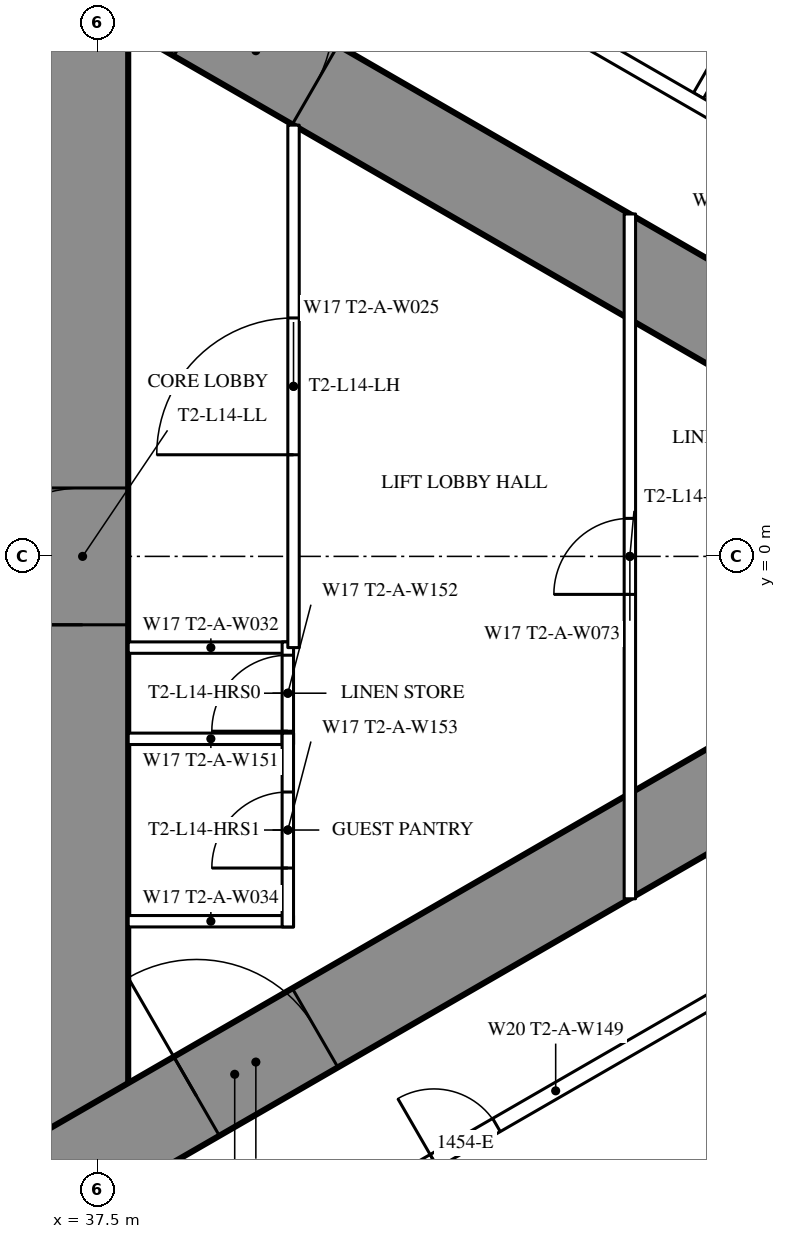
"""IFC4 building model, lengths in metres.
Left out: names, types, materials, properties, quantities, classifications, styles, units other than length and angle.
Written with IfcOpenShell. Run it as: python <this file> out.ifc"""

import sys

from ifc_helpers import new_model, si_unit, direction, frame, frame_2d, origin, place, context, subcontext, project, spatial, rectangle, extrude, element, fill, save


model = new_model("IFC4")
c1 = context("Model", 3, precision=1e-05, world=origin(), true_north=direction((0.0, 1.0)))
c2 = subcontext(c1, "Body", "Model", "MODEL_VIEW")
j1 = project(units=[si_unit("LENGTHUNIT", "METRE"), si_unit("PLANEANGLEUNIT", "RADIAN")], contexts=[c1])
p1 = place(None, origin())
s1 = spatial("IfcSite", under=j1, at=p1, CompositionType="ELEMENT")
p2 = place(p1, origin())
s2 = spatial("IfcBuilding", under=s1, at=p2, CompositionType="ELEMENT")
p3 = place(p2, frame((0.0, 0.0, 56.5)))
s3 = spatial("IfcBuildingStorey", under=s2, at=p3, CompositionType="ELEMENT", Elevation=56.5)
p4 = place(p3, frame((37.3, -8.6, 0.0), z_axis=(0.0, 0.0, 1.0), x_axis=(0.0, 1.0, 0.0)))
e1 = element("IfcWall", 1, at=p4, inside=s3, PredefinedType="SHEAR", context=c2, shape_type="SweptSolid", body=[
    extrude(rectangle(XDim=17.2, YDim=1.2, at=frame_2d((8.6, 0.0))), origin(), (0.0, 0.0, 1.0), 3.5),
])
p5 = place(p4, frame((7.7, 0.0, 0.0)))
e2 = element("IfcOpeningElement", 2, at=p5, cuts=e1, PredefinedType="OPENING", context=c2, shape_type="SweptSolid", body=[
    extrude(rectangle(XDim=1.8, YDim=2.2, at=frame_2d((0.9, 1.1))), frame((0.0, 0.61, 0.0), z_axis=(0.0, -1.0, 0.0), x_axis=(1.0, 0.0, 0.0)), (0.0, 0.0, 1.0), 1.22),
])
p6 = place(p3, frame((27.2, -13.8, 0.0), z_axis=(0.0, 0.0, 1.0), x_axis=(0.866027159892, 0.499996958321, 0.0)))
e3 = element("IfcWall", 3, at=p6, inside=s3, PredefinedType="SHEAR", context=c2, shape_type="SweptSolid", body=[
    extrude(rectangle(XDim=27.947, YDim=1.2, at=frame_2d((13.973, 0.0))), origin(), (0.0, 0.0, 1.0), 3.5),
])
p7 = place(p6, frame((4.6, 0.0, 0.0)))
e4 = element("IfcOpeningElement", 4, at=p7, cuts=e3, PredefinedType="OPENING", context=c2, shape_type="SweptSolid", body=[
    extrude(rectangle(XDim=1.0, YDim=2.2, at=frame_2d((0.5, 1.1))), frame((0.0, 0.61, 0.0), z_axis=(0.0, -1.0, 0.0), x_axis=(1.0, 0.0, 0.0)), (0.0, 0.0, 1.0), 1.22),
])
p8 = place(p6, frame((13.395, 0.0, 0.0)))
e5 = element("IfcOpeningElement", 5, at=p8, cuts=e3, PredefinedType="OPENING", context=c2, shape_type="SweptSolid", body=[
    extrude(rectangle(XDim=1.8, YDim=2.2, at=frame_2d((0.9, 1.1))), frame((0.0, 0.61, 0.0), z_axis=(0.0, -1.0, 0.0), x_axis=(1.0, 0.0, 0.0)), (0.0, 0.0, 1.0), 1.22),
])
p9 = place(p3, frame((27.2, 13.8, 0.0), z_axis=(0.0, 0.0, 1.0), x_axis=(0.866024515034, -0.500001539357, 0.0)))
e6 = element("IfcWall", 6, at=p9, inside=s3, PredefinedType="SHEAR", context=c2, shape_type="SweptSolid", body=[
    extrude(rectangle(XDim=26.907, YDim=1.2, at=frame_2d((13.454, 0.0))), origin(), (0.0, 0.0, 1.0), 3.5),
])
p10 = place(p9, frame((4.6, 0.0, 0.0)))
e7 = element("IfcOpeningElement", 7, at=p10, cuts=e6, PredefinedType="OPENING", context=c2, shape_type="SweptSolid", body=[
    extrude(rectangle(XDim=1.0, YDim=2.2, at=frame_2d((0.5, 1.1))), frame((0.0, 0.61, 0.0), z_axis=(0.0, -1.0, 0.0), x_axis=(1.0, 0.0, 0.0)), (0.0, 0.0, 1.0), 1.22),
])
p11 = place(p9, frame((13.395, 0.0, 0.0)))
e8 = element("IfcOpeningElement", 8, at=p11, cuts=e6, PredefinedType="OPENING", context=c2, shape_type="SweptSolid", body=[
    extrude(rectangle(XDim=1.8, YDim=2.2, at=frame_2d((0.9, 1.1))), frame((0.0, 0.61, 0.0), z_axis=(0.0, -1.0, 0.0), x_axis=(1.0, 0.0, 0.0)), (0.0, 0.0, 1.0), 1.22),
])
p12 = place(p3, frame((45.403, 6.062, 0.0), z_axis=(0.0, 0.0, 1.0), x_axis=(0.500013434677, 0.866017647131, 0.0)))
e9 = element("IfcWall", 9, at=p12, inside=s3, PredefinedType="PARTITIONING", context=c2, shape_type="SweptSolid", body=[
    extrude(rectangle(XDim=9.902, YDim=0.15, at=frame_2d((4.951, 0.0))), origin(), (0.0, 0.0, 1.0), 2.25),
])
p13 = place(p3, frame((36.834, 10.894, 0.0), z_axis=(0.0, 0.0, 1.0), x_axis=(0.866028157229, -0.499995230863, 0.0)))
e10 = element("IfcWall", 10, at=p13, inside=s3, PredefinedType="PARTITIONING", context=c2, shape_type="SweptSolid", body=[
    extrude(rectangle(XDim=21.667, YDim=0.2, at=frame_2d((10.833, 0.0))), origin(), (0.0, 0.0, 1.0), 3.25),
])
p14 = place(p13, frame((14.55, 0.0, 0.0)))
e11 = element("IfcOpeningElement", 11, at=p14, cuts=e10, PredefinedType="OPENING", context=c2, shape_type="SweptSolid", body=[
    extrude(rectangle(XDim=0.95, YDim=2.2, at=frame_2d((0.475, 1.1))), frame((0.0, 0.11, 0.0), z_axis=(0.0, -1.0, 0.0), x_axis=(1.0, 0.0, 0.0)), (0.0, 0.0, 1.0), 0.22),
])
p15 = place(p13, frame((10.5, 0.0, 0.0)))
e12 = element("IfcOpeningElement", 12, at=p15, cuts=e10, PredefinedType="OPENING", context=c2, shape_type="SweptSolid", body=[
    extrude(rectangle(XDim=0.95, YDim=2.2, at=frame_2d((0.475, 1.1))), frame((0.0, 0.11, 0.0), z_axis=(0.0, -1.0, 0.0), x_axis=(1.0, 0.0, 0.0)), (0.0, 0.0, 1.0), 0.22),
])
p16 = place(p13, frame((4.292, 0.0, 0.0)))
e13 = element("IfcOpeningElement", 13, at=p16, cuts=e10, PredefinedType="OPENING", context=c2, shape_type="SweptSolid", body=[
    extrude(rectangle(XDim=1.0, YDim=2.2, at=frame_2d((0.5, 1.1))), frame((0.0, 0.11, 0.0), z_axis=(0.0, -1.0, 0.0), x_axis=(1.0, 0.0, 0.0)), (0.0, 0.0, 1.0), 0.22),
])
p17 = place(p13, frame((0.246, 0.0, 0.0)))
e14 = element("IfcOpeningElement", 14, at=p17, cuts=e10, PredefinedType="OPENING", context=c2, shape_type="SweptSolid", body=[
    extrude(rectangle(XDim=0.9, YDim=2.2, at=frame_2d((0.45, 1.1))), frame((0.0, 0.11, 0.0), z_axis=(0.0, -1.0, 0.0), x_axis=(1.0, 0.0, 0.0)), (0.0, 0.0, 1.0), 0.22),
])
p18 = place(p3, frame((37.96, -10.243, 0.0), z_axis=(0.0, 0.0, 1.0), x_axis=(0.866030548046, 0.499991089772, 0.0)))
e15 = element("IfcWall", 15, at=p18, inside=s3, PredefinedType="PARTITIONING", context=c2, shape_type="SweptSolid", body=[
    extrude(rectangle(XDim=12.849, YDim=0.2, at=frame_2d((6.425, 0.0))), origin(), (0.0, 0.0, 1.0), 3.25),
])
p19 = place(p18, frame((4.575, 0.0, 0.0)))
e16 = element("IfcOpeningElement", 16, at=p19, cuts=e15, PredefinedType="OPENING", context=c2, shape_type="SweptSolid", body=[
    extrude(rectangle(XDim=0.95, YDim=2.2, at=frame_2d((0.475, 1.1))), frame((0.0, 0.11, 0.0), z_axis=(0.0, -1.0, 0.0), x_axis=(1.0, 0.0, 0.0)), (0.0, 0.0, 1.0), 0.22),
])
p20 = place(p18, frame((0.6, 0.0, 0.0)))
e17 = element("IfcOpeningElement", 17, at=p20, cuts=e15, PredefinedType="OPENING", context=c2, shape_type="SweptSolid", body=[
    extrude(rectangle(XDim=0.95, YDim=2.2, at=frame_2d((0.475, 1.1))), frame((0.0, 0.11, 0.0), z_axis=(0.0, -1.0, 0.0), x_axis=(1.0, 0.0, 0.0)), (0.0, 0.0, 1.0), 0.22),
])
for number, where, z_axis, x_axis in (
    (18, (37.9, -1.2, 0.0), (0.0, 0.0, 1.0), (1.0, 0.0, 0.0)),
    (19, (37.9, -2.4, 0.0), (0.0, 0.0, 1.0), (1.0, 0.0, 0.0)),
    (20, (37.9, -4.8, 0.0), (0.0, 0.0, 1.0), (1.0, 0.0, 0.0)),
):
    element("IfcWall", number, at=place(p3, frame(where, z_axis=z_axis, x_axis=x_axis)), inside=s3, PredefinedType="PARTITIONING", context=c2, shape_type="SweptSolid", body=[
        extrude(rectangle(XDim=2.175, YDim=0.15, at=frame_2d((1.087, 0.0))), origin(), (0.0, 0.0, 1.0), 3.25),
    ])
p21 = place(p3, frame((40.0, -2.475, 0.0), z_axis=(0.0, 0.0, 1.0), x_axis=(0.0, 1.0, 0.0)))
e21 = element("IfcWall", 21, at=p21, inside=s3, PredefinedType="PARTITIONING", context=c2, shape_type="SweptSolid", body=[
    extrude(rectangle(XDim=1.35, YDim=0.15, at=frame_2d((0.675, 0.0))), origin(), (0.0, 0.0, 1.0), 3.25),
])
p22 = place(p21, frame((0.175, 0.0, 0.0)))
e22 = element("IfcOpeningElement", 22, at=p22, cuts=e21, PredefinedType="OPENING", context=c2, shape_type="SweptSolid", body=[
    extrude(rectangle(XDim=1.0, YDim=2.2, at=frame_2d((0.5, 1.1))), frame((0.0, 0.085, 0.0), z_axis=(0.0, -1.0, 0.0), x_axis=(1.0, 0.0, 0.0)), (0.0, 0.0, 1.0), 0.17),
])
p23 = place(p3, frame((40.0, -4.875, 0.0), z_axis=(0.0, 0.0, 1.0), x_axis=(0.0, 1.0, 0.0)))
e23 = element("IfcWall", 23, at=p23, inside=s3, PredefinedType="PARTITIONING", context=c2, shape_type="SweptSolid", body=[
    extrude(rectangle(XDim=2.55, YDim=0.15, at=frame_2d((1.275, 0.0))), origin(), (0.0, 0.0, 1.0), 3.25),
])
p24 = place(p23, frame((0.775, 0.0, 0.0)))
e24 = element("IfcOpeningElement", 24, at=p24, cuts=e23, PredefinedType="OPENING", context=c2, shape_type="SweptSolid", body=[
    extrude(rectangle(XDim=1.0, YDim=2.2, at=frame_2d((0.5, 1.1))), frame((0.0, 0.085, 0.0), z_axis=(0.0, -1.0, 0.0), x_axis=(1.0, 0.0, 0.0)), (0.0, 0.0, 1.0), 0.17),
])
p25 = place(p3, frame((40.075, -1.2, 0.0), z_axis=(0.0, 0.0, 1.0), x_axis=(0.0, 1.0, 0.0)))
e25 = element("IfcWall", 25, at=p25, inside=s3, PredefinedType="PARTITIONING", context=c2, shape_type="SweptSolid", body=[
    extrude(rectangle(XDim=6.874, YDim=0.15, at=frame_2d((3.437, 0.0))), origin(), (0.0, 0.0, 1.0), 3.25),
])
p26 = place(p25, frame((2.537, 0.0, 0.0)))
e26 = element("IfcOpeningElement", 26, at=p26, cuts=e25, PredefinedType="OPENING", context=c2, shape_type="SweptSolid", body=[
    extrude(rectangle(XDim=1.8, YDim=2.2, at=frame_2d((0.9, 1.1))), frame((0.0, 0.085, 0.0), z_axis=(0.0, -1.0, 0.0), x_axis=(1.0, 0.0, 0.0)), (0.0, 0.0, 1.0), 0.17),
])
p27 = place(p3, frame((44.5, -4.505, 0.0), z_axis=(0.0, 0.0, 1.0), x_axis=(0.0, 1.0, 0.0)))
e27 = element("IfcWall", 27, at=p27, inside=s3, PredefinedType="PARTITIONING", context=c2, shape_type="SweptSolid", body=[
    extrude(rectangle(XDim=9.009, YDim=0.15, at=frame_2d((4.505, 0.0))), origin(), (0.0, 0.0, 1.0), 2.45),
])
p28 = place(p27, frame((4.005, 0.0, 0.0)))
e28 = element("IfcOpeningElement", 28, at=p28, cuts=e27, PredefinedType="OPENING", context=c2, shape_type="SweptSolid", body=[
    extrude(rectangle(XDim=1.0, YDim=2.2, at=frame_2d((0.5, 1.1))), frame((0.0, 0.085, 0.0), z_axis=(0.0, -1.0, 0.0), x_axis=(1.0, 0.0, 0.0)), (0.0, 0.0, 1.0), 0.17),
])
p29 = place(p19, origin())
e29 = element("IfcDoor", 29, at=p29, inside=s3, OperationType="SINGLE_SWING_LEFT", PredefinedType="DOOR", context=c2, shape_type="SweptSolid", body=[
    extrude(rectangle(XDim=0.95, YDim=2.2, at=frame_2d((0.475, 1.1))), frame((0.0, 0.025, 0.0), z_axis=(0.0, -1.0, 0.0), x_axis=(1.0, 0.0, 0.0)), (0.0, 0.0, 1.0), 0.05),
])
fill(e16, e29)
p30 = place(p22, origin())
e30 = element("IfcDoor", 30, at=p30, inside=s3, OperationType="SINGLE_SWING_LEFT", PredefinedType="DOOR", context=c2, shape_type="SweptSolid", body=[
    extrude(rectangle(XDim=1.0, YDim=2.2, at=frame_2d((0.5, 1.1))), frame((0.0, 0.025, 0.0), z_axis=(0.0, -1.0, 0.0), x_axis=(1.0, 0.0, 0.0)), (0.0, 0.0, 1.0), 0.05),
])
fill(e22, e30)
p31 = place(p24, origin())
e31 = element("IfcDoor", 31, at=p31, inside=s3, OperationType="SINGLE_SWING_LEFT", PredefinedType="DOOR", context=c2, shape_type="SweptSolid", body=[
    extrude(rectangle(XDim=1.0, YDim=2.2, at=frame_2d((0.5, 1.1))), frame((0.0, 0.025, 0.0), z_axis=(0.0, -1.0, 0.0), x_axis=(1.0, 0.0, 0.0)), (0.0, 0.0, 1.0), 0.05),
])
fill(e24, e31)
p32 = place(p26, origin())
e32 = element("IfcDoor", 32, at=p32, inside=s3, OperationType="DOUBLE_DOOR_SINGLE_SWING", PredefinedType="DOOR", context=c2, shape_type="SweptSolid", body=[
    extrude(rectangle(XDim=1.8, YDim=2.2, at=frame_2d((0.9, 1.1))), frame((0.0, 0.025, 0.0), z_axis=(0.0, -1.0, 0.0), x_axis=(1.0, 0.0, 0.0)), (0.0, 0.0, 1.0), 0.05),
])
fill(e26, e32)
p33 = place(p28, origin())
e33 = element("IfcDoor", 33, at=p33, inside=s3, OperationType="SINGLE_SWING_LEFT", PredefinedType="DOOR", context=c2, shape_type="SweptSolid", body=[
    extrude(rectangle(XDim=1.0, YDim=2.2, at=frame_2d((0.5, 1.1))), frame((0.0, 0.025, 0.0), z_axis=(0.0, -1.0, 0.0), x_axis=(1.0, 0.0, 0.0)), (0.0, 0.0, 1.0), 0.05),
])
fill(e28, e33)
p34 = place(p8, origin())
e34 = element("IfcDoor", 34, at=p34, inside=s3, OperationType="DOUBLE_DOOR_SINGLE_SWING", PredefinedType="DOOR", context=c2, shape_type="SweptSolid", body=[
    extrude(rectangle(XDim=1.8, YDim=2.2, at=frame_2d((0.9, 1.1))), frame((0.0, 0.025, 0.0), z_axis=(0.0, -1.0, 0.0), x_axis=(1.0, 0.0, 0.0)), (0.0, 0.0, 1.0), 0.05),
])
fill(e5, e34)
p35 = place(p11, origin())
e35 = element("IfcDoor", 35, at=p35, inside=s3, OperationType="DOUBLE_DOOR_SINGLE_SWING", PredefinedType="DOOR", context=c2, shape_type="SweptSolid", body=[
    extrude(rectangle(XDim=1.8, YDim=2.2, at=frame_2d((0.9, 1.1))), frame((0.0, 0.025, 0.0), z_axis=(0.0, -1.0, 0.0), x_axis=(1.0, 0.0, 0.0)), (0.0, 0.0, 1.0), 0.05),
])
fill(e8, e35)
p36 = place(p5, origin())
e36 = element("IfcDoor", 36, at=p36, inside=s3, OperationType="DOUBLE_DOOR_SINGLE_SWING", PredefinedType="DOOR", context=c2, shape_type="SweptSolid", body=[
    extrude(rectangle(XDim=1.8, YDim=2.2, at=frame_2d((0.9, 1.1))), frame((0.0, 0.025, 0.0), z_axis=(0.0, -1.0, 0.0), x_axis=(1.0, 0.0, 0.0)), (0.0, 0.0, 1.0), 0.05),
])
fill(e2, e36)
save(model, sys.argv[1])
